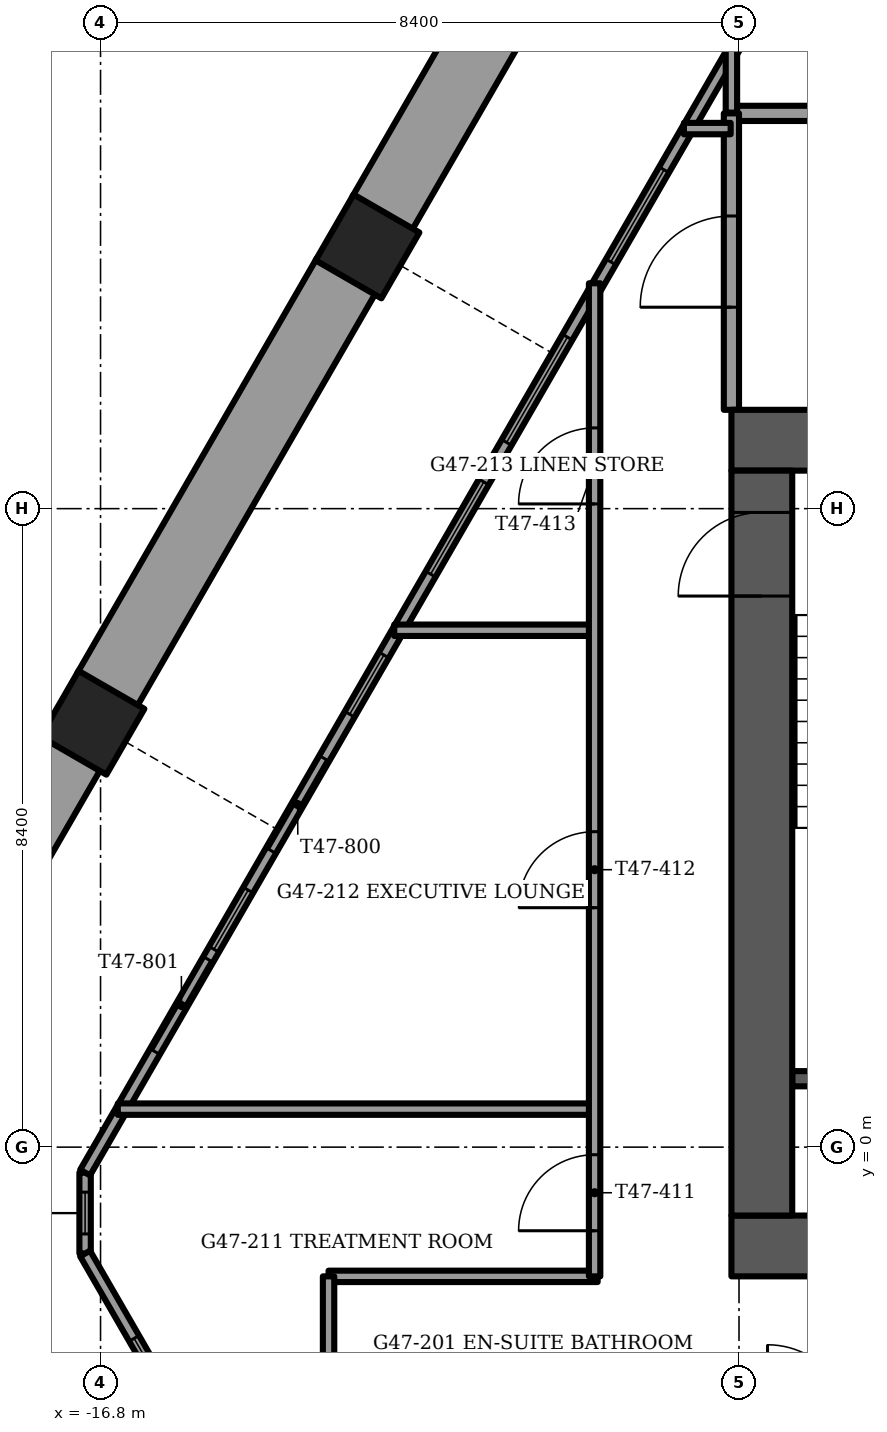
"""IFC4 building model, lengths in metres.
Left out: names, types, materials, properties, quantities, classifications, styles, units other than length and angle.
Written with IfcOpenShell. Run it as: python <this file> out.ifc"""

import sys

from ifc_helpers import new_model, si_unit, direction, frame, frame_2d, origin, origin_2d, place, context, subcontext, project, spatial, rectangle, extrude, element, fill, save


model = new_model("IFC4")
c1 = context("Model", 3, precision=1e-05, world=origin(), true_north=direction((0.0, 1.0)))
c2 = subcontext(c1, "Body", "Model", "MODEL_VIEW")
j1 = project(units=[si_unit("LENGTHUNIT", "METRE"), si_unit("PLANEANGLEUNIT", "RADIAN")], contexts=[c1])
p1 = place(None, origin())
s1 = spatial("IfcSite", under=j1, at=p1, CompositionType="ELEMENT")
p2 = place(p1, origin())
s2 = spatial("IfcBuilding", under=s1, at=p2, CompositionType="ELEMENT")
p3 = place(p2, frame((0.0, 0.0, 190.75)))
s3 = spatial("IfcBuildingStorey", under=s2, at=p3, CompositionType="ELEMENT", Elevation=190.75)
for number, where, z_axis, x_axis in (
    (1, (-13.288, 11.85, -1.2), (0.0, 0.0, 1.0), (0.5, 0.866, 0.0)),
    (2, (-16.906, 5.583, -1.2), (0.0, 0.0, 1.0), (0.5, 0.866, 0.0)),
):
    element("IfcColumn", number, at=place(p3, frame(where, z_axis=z_axis, x_axis=x_axis)), inside=s3, PredefinedType="COLUMN", context=c2, shape_type="SweptSolid", body=[
        extrude(rectangle(XDim=1.0, YDim=1.0, at=origin_2d()), origin(), (0.0, 0.0, 1.0), 3.75),
    ])
p4 = place(p3, frame((-8.5, -1.3, -0.3), z_axis=(0.0, 0.0, 1.0), x_axis=(1.0, 0.0, 0.0)))
e3 = element("IfcWall", 3, at=p4, inside=s3, PredefinedType="SHEAR", context=c2, shape_type="SweptSolid", body=[
    extrude(rectangle(XDim=17.0, YDim=0.8, at=frame_2d((8.5, 0.0))), origin(), (0.0, 0.0, 1.0), 3.75),
])
p5 = place(p4, frame((7.7, 0.0, 0.0)))
e4 = element("IfcOpeningElement", 4, at=p5, cuts=e3, PredefinedType="OPENING", context=c2, shape_type="SweptSolid", body=[
    extrude(rectangle(XDim=1.6, YDim=2.1, at=frame_2d((0.8, 1.05))), frame((0.0, 0.4, 0.0), z_axis=(0.0, -1.0, 0.0), x_axis=(1.0, 0.0, 0.0)), (0.0, 0.0, 1.0), 0.8),
])
p6 = place(p3, frame((-8.5, 9.3, -0.3), z_axis=(0.0, 0.0, 1.0), x_axis=(1.0, 0.0, 0.0)))
e5 = element("IfcWall", 5, at=p6, inside=s3, PredefinedType="SHEAR", context=c2, shape_type="SweptSolid", body=[
    extrude(rectangle(XDim=17.0, YDim=0.8, at=frame_2d((8.5, 0.0))), origin(), (0.0, 0.0, 1.0), 3.75),
])
p7 = place(p6, frame((7.7, 0.0, 0.0)))
e6 = element("IfcOpeningElement", 6, at=p7, cuts=e5, PredefinedType="OPENING", context=c2, shape_type="SweptSolid", body=[
    extrude(rectangle(XDim=1.6, YDim=2.1, at=frame_2d((0.8, 1.05))), frame((0.0, 0.4, 0.0), z_axis=(0.0, -1.0, 0.0), x_axis=(1.0, 0.0, 0.0)), (0.0, 0.0, 1.0), 0.8),
])
p8 = place(p6, frame((1.75, 0.0, 0.0)))
e7 = element("IfcOpeningElement", 7, at=p8, cuts=e5, PredefinedType="OPENING", context=c2, shape_type="SweptSolid", body=[
    extrude(rectangle(XDim=1.1, YDim=2.1, at=frame_2d((0.55, 1.05))), frame((0.0, 0.4, 0.0), z_axis=(0.0, -1.0, 0.0), x_axis=(1.0, 0.0, 0.0)), (0.0, 0.0, 1.0), 0.8),
])
p9 = place(p6, frame((14.15, 0.0, 0.0)))
e8 = element("IfcOpeningElement", 8, at=p9, cuts=e5, PredefinedType="OPENING", context=c2, shape_type="SweptSolid", body=[
    extrude(rectangle(XDim=1.1, YDim=2.1, at=frame_2d((0.55, 1.05))), frame((0.0, 0.4, 0.0), z_axis=(0.0, -1.0, 0.0), x_axis=(1.0, 0.0, 0.0)), (0.0, 0.0, 1.0), 0.8),
])
p10 = place(p3, frame((-8.1, -0.9, -0.3), z_axis=(0.0, 0.0, 1.0), x_axis=(0.0, 1.0, 0.0)))
e9 = element("IfcWall", 9, at=p10, inside=s3, PredefinedType="SHEAR", context=c2, shape_type="SweptSolid", body=[
    extrude(rectangle(XDim=9.8, YDim=0.8, at=frame_2d((4.9, 0.0))), origin(), (0.0, 0.0, 1.0), 3.75),
])
p11 = place(p10, frame((8.15, 0.0, 0.0)))
e10 = element("IfcOpeningElement", 10, at=p11, cuts=e9, PredefinedType="OPENING", context=c2, shape_type="SweptSolid", body=[
    extrude(rectangle(XDim=1.1, YDim=2.1, at=frame_2d((0.55, 1.05))), frame((0.0, 0.4, 0.0), z_axis=(0.0, -1.0, 0.0), x_axis=(1.0, 0.0, 0.0)), (0.0, 0.0, 1.0), 0.8),
])
p12 = place(p3, frame((-9.864, 17.88, 0.0), z_axis=(0.0, 0.0, 1.0), x_axis=(-0.500005767435, -0.866022073929, 0.0)))
e11 = element("IfcWall", 11, at=p12, inside=s3, PredefinedType="PARAPET", context=c2, shape_type="SweptSolid", body=[
    extrude(rectangle(XDim=6.465, YDim=0.9, at=frame_2d((3.232, 0.0))), origin(), (0.0, 0.0, 1.0), 1.1),
])
p13 = place(p3, frame((-13.566, 11.468, 0.0), z_axis=(0.0, 0.0, 1.0), x_axis=(-0.500013351051, -0.866017695414, 0.0)))
e12 = element("IfcWall", 12, at=p13, inside=s3, PredefinedType="PARAPET", context=c2, shape_type="SweptSolid", body=[
    extrude(rectangle(XDim=6.296, YDim=0.9, at=frame_2d((3.148, 0.0))), origin(), (0.0, 0.0, 1.0), 1.1),
])
p14 = place(p3, frame((-17.185, 5.201, 0.0), z_axis=(0.0, 0.0, 1.0), x_axis=(-0.499977443261, -0.866038426532, 0.0)))
e13 = element("IfcWall", 13, at=p14, inside=s3, PredefinedType="PARAPET", context=c2, shape_type="SweptSolid", body=[
    extrude(rectangle(XDim=6.465, YDim=0.9, at=frame_2d((3.232, 0.0))), origin(), (0.0, 0.0, 1.0), 1.1),
])
p15 = place(p3, frame((-6.826, 17.292, 0.0), z_axis=(0.0, 0.0, 1.0), x_axis=(-0.50000659594, -0.866021595583, 0.0)))
e14 = element("IfcWall", 14, at=p15, inside=s3, PredefinedType="SOLIDWALL", context=c2, shape_type="SweptSolid", body=[
    extrude(rectangle(XDim=20.354, YDim=0.15, at=frame_2d((10.177, 0.0))), origin(), (0.0, 0.0, 1.0), 3.45),
])
p16 = place(p15, frame((5.12, 0.0, 0.15)))
e15 = element("IfcOpeningElement", 15, at=p16, cuts=e14, PredefinedType="OPENING", context=c2, shape_type="SweptSolid", body=[
    extrude(rectangle(XDim=1.4, YDim=2.85, at=frame_2d((0.7, 1.425))), frame((0.0, 0.075, 0.0), z_axis=(0.0, -1.0, 0.0), x_axis=(1.0, 0.0, 0.0)), (0.0, 0.0, 1.0), 0.15),
])
p17 = place(p15, frame((7.663, 0.0, 0.15)))
e16 = element("IfcOpeningElement", 16, at=p17, cuts=e14, PredefinedType="OPENING", context=c2, shape_type="SweptSolid", body=[
    extrude(rectangle(XDim=1.6, YDim=2.85, at=frame_2d((0.8, 1.425))), frame((0.0, 0.075, 0.0), z_axis=(0.0, -1.0, 0.0), x_axis=(1.0, 0.0, 0.0)), (0.0, 0.0, 1.0), 0.15),
])
p18 = place(p15, frame((9.863, 0.0, 0.15)))
e17 = element("IfcOpeningElement", 17, at=p18, cuts=e14, PredefinedType="OPENING", context=c2, shape_type="SweptSolid", body=[
    extrude(rectangle(XDim=1.4, YDim=2.85, at=frame_2d((0.7, 1.425))), frame((0.0, 0.075, 0.0), z_axis=(0.0, -1.0, 0.0), x_axis=(1.0, 0.0, 0.0)), (0.0, 0.0, 1.0), 0.15),
])
p19 = place(p15, frame((12.492, 0.0, 0.15)))
e18 = element("IfcOpeningElement", 18, at=p19, cuts=e14, PredefinedType="OPENING", context=c2, shape_type="SweptSolid", body=[
    extrude(rectangle(XDim=0.9, YDim=2.85, at=frame_2d((0.45, 1.425))), frame((0.0, 0.075, 0.0), z_axis=(0.0, -1.0, 0.0), x_axis=(1.0, 0.0, 0.0)), (0.0, 0.0, 1.0), 0.15),
])
p20 = place(p15, frame((14.063, 0.0, 0.0)))
e19 = element("IfcOpeningElement", 19, at=p20, cuts=e14, PredefinedType="OPENING", context=c2, shape_type="SweptSolid", body=[
    extrude(rectangle(XDim=1.4, YDim=2.4, at=frame_2d((0.7, 1.2))), frame((0.0, 0.075, 0.0), z_axis=(0.0, -1.0, 0.0), x_axis=(1.0, 0.0, 0.0)), (0.0, 0.0, 1.0), 0.15),
])
p21 = place(p15, frame((16.063, 0.0, 0.15)))
e20 = element("IfcOpeningElement", 20, at=p21, cuts=e14, PredefinedType="OPENING", context=c2, shape_type="SweptSolid", body=[
    extrude(rectangle(XDim=0.9, YDim=2.85, at=frame_2d((0.45, 1.425))), frame((0.0, 0.075, 0.0), z_axis=(0.0, -1.0, 0.0), x_axis=(1.0, 0.0, 0.0)), (0.0, 0.0, 1.0), 0.15),
])
p22 = place(p15, frame((17.116, 0.0, 0.0)))
e21 = element("IfcOpeningElement", 21, at=p22, cuts=e14, PredefinedType="OPENING", context=c2, shape_type="SweptSolid", body=[
    extrude(rectangle(XDim=1.4, YDim=2.4, at=frame_2d((0.7, 1.2))), frame((0.0, 0.075, 0.0), z_axis=(0.0, -1.0, 0.0), x_axis=(1.0, 0.0, 0.0)), (0.0, 0.0, 1.0), 0.15),
])
p23 = place(p15, frame((0.735, 0.0, 0.15)))
e22 = element("IfcOpeningElement", 22, at=p23, cuts=e14, PredefinedType="OPENING", context=c2, shape_type="SweptSolid", body=[
    extrude(rectangle(XDim=1.6, YDim=2.73, at=frame_2d((0.8, 1.365))), frame((0.0, 0.075, 0.0), z_axis=(0.0, -1.0, 0.0), x_axis=(1.0, 0.0, 0.0)), (0.0, 0.0, 1.0), 0.15),
])
p24 = place(p3, frame((-17.003, -1.4, 0.0), z_axis=(0.0, 0.0, 1.0), x_axis=(0.500006098247, -0.866021882931, 0.0)))
e23 = element("IfcWall", 23, at=p24, inside=s3, PredefinedType="SOLIDWALL", context=c2, shape_type="SweptSolid", body=[
    extrude(rectangle(XDim=14.578, YDim=0.15, at=frame_2d((7.289, 0.0))), origin(), (0.0, 0.0, 1.0), 3.45),
])
p25 = place(p24, frame((1.289, 0.0, 0.15)))
e24 = element("IfcOpeningElement", 24, at=p25, cuts=e23, PredefinedType="OPENING", context=c2, shape_type="SweptSolid", body=[
    extrude(rectangle(XDim=0.9, YDim=2.85, at=frame_2d((0.45, 1.425))), frame((0.0, 0.075, 0.0), z_axis=(0.0, -1.0, 0.0), x_axis=(1.0, 0.0, 0.0)), (0.0, 0.0, 1.0), 0.15),
])
p26 = place(p24, frame((3.489, 0.0, 0.15)))
e25 = element("IfcOpeningElement", 25, at=p26, cuts=e23, PredefinedType="OPENING", context=c2, shape_type="SweptSolid", body=[
    extrude(rectangle(XDim=1.4, YDim=2.85, at=frame_2d((0.7, 1.425))), frame((0.0, 0.075, 0.0), z_axis=(0.0, -1.0, 0.0), x_axis=(1.0, 0.0, 0.0)), (0.0, 0.0, 1.0), 0.15),
])
p27 = place(p24, frame((5.982, 0.0, 0.15)))
e26 = element("IfcOpeningElement", 26, at=p27, cuts=e23, PredefinedType="OPENING", context=c2, shape_type="SweptSolid", body=[
    extrude(rectangle(XDim=1.6, YDim=2.85, at=frame_2d((0.8, 1.425))), frame((0.0, 0.075, 0.0), z_axis=(0.0, -1.0, 0.0), x_axis=(1.0, 0.0, 0.0)), (0.0, 0.0, 1.0), 0.15),
])
p28 = place(p24, frame((7.689, 0.0, 0.0)))
e27 = element("IfcOpeningElement", 27, at=p28, cuts=e23, PredefinedType="OPENING", context=c2, shape_type="SweptSolid", body=[
    extrude(rectangle(XDim=1.4, YDim=2.4, at=frame_2d((0.7, 1.2))), frame((0.0, 0.075, 0.0), z_axis=(0.0, -1.0, 0.0), x_axis=(1.0, 0.0, 0.0)), (0.0, 0.0, 1.0), 0.15),
])
p29 = place(p24, frame((9.689, 0.0, 0.15)))
e28 = element("IfcOpeningElement", 28, at=p29, cuts=e23, PredefinedType="OPENING", context=c2, shape_type="SweptSolid", body=[
    extrude(rectangle(XDim=0.9, YDim=2.85, at=frame_2d((0.45, 1.425))), frame((0.0, 0.075, 0.0), z_axis=(0.0, -1.0, 0.0), x_axis=(1.0, 0.0, 0.0)), (0.0, 0.0, 1.0), 0.15),
])
p30 = place(p3, frame((-17.003, -0.335, 0.0), z_axis=(0.0, 0.0, 1.0), x_axis=(0.0, -1.0, 0.0)))
e29 = element("IfcWall", 29, at=p30, inside=s3, PredefinedType="SOLIDWALL", context=c2, shape_type="SweptSolid", body=[
    extrude(rectangle(XDim=1.065, YDim=0.15, at=frame_2d((0.533, 0.0))), origin(), (0.0, 0.0, 1.0), 3.45),
])
p31 = place(p30, frame((0.258, 0.0, 0.15)))
e30 = element("IfcOpeningElement", 30, at=p31, cuts=e29, PredefinedType="OPENING", context=c2, shape_type="SweptSolid", body=[
    extrude(rectangle(XDim=0.55, YDim=2.85, at=frame_2d((0.275, 1.425))), frame((0.0, 0.075, 0.0), z_axis=(0.0, -1.0, 0.0), x_axis=(1.0, 0.0, 0.0)), (0.0, 0.0, 1.0), 0.15),
])
p32 = place(p3, frame((-7.7, 0.9, -0.3), z_axis=(0.0, 0.0, 1.0), x_axis=(1.0, 0.0, 0.0)))
e31 = element("IfcWall", 31, at=p32, inside=s3, PredefinedType="SOLIDWALL", context=c2, shape_type="SweptSolid", body=[
    extrude(rectangle(XDim=3.25, YDim=0.2, at=frame_2d((1.625, 0.0))), origin(), (0.0, 0.0, 1.0), 3.75),
])
p33 = place(p3, frame((-8.5, 13.6, 0.0), z_axis=(0.0, 0.0, 1.0), x_axis=(1.0, 0.0, 0.0)))
e32 = element("IfcWall", 32, at=p33, inside=s3, PredefinedType="PARTITIONING", context=c2, shape_type="SweptSolid", body=[
    extrude(rectangle(XDim=17.0, YDim=0.2, at=frame_2d((8.5, 0.0))), origin(), (0.0, 0.0, 1.0), 3.45),
])
p34 = place(p33, frame((8.0, 0.0, 0.0)))
e33 = element("IfcOpeningElement", 33, at=p34, cuts=e32, PredefinedType="OPENING", context=c2, shape_type="SweptSolid", body=[
    extrude(rectangle(XDim=1.0, YDim=2.1, at=frame_2d((0.5, 1.05))), frame((0.0, 0.1, 0.0), z_axis=(0.0, -1.0, 0.0), x_axis=(1.0, 0.0, 0.0)), (0.0, 0.0, 1.0), 0.2),
])
p35 = place(p3, frame((-8.5, 9.7, 0.0), z_axis=(0.0, 0.0, 1.0), x_axis=(0.0, 1.0, 0.0)))
e34 = element("IfcWall", 34, at=p35, inside=s3, PredefinedType="PARTITIONING", context=c2, shape_type="SweptSolid", body=[
    extrude(rectangle(XDim=3.9, YDim=0.2, at=frame_2d((1.95, 0.0))), origin(), (0.0, 0.0, 1.0), 3.45),
])
p36 = place(p35, frame((1.35, 0.0, 0.0)))
e35 = element("IfcOpeningElement", 35, at=p36, cuts=e34, PredefinedType="OPENING", context=c2, shape_type="SweptSolid", body=[
    extrude(rectangle(XDim=1.2, YDim=2.1, at=frame_2d((0.6, 1.05))), frame((0.0, 0.1, 0.0), z_axis=(0.0, -1.0, 0.0), x_axis=(1.0, 0.0, 0.0)), (0.0, 0.0, 1.0), 0.2),
])
p37 = place(p3, frame((-13.8, -1.7, 0.0), z_axis=(0.0, 0.0, 1.0), x_axis=(1.0, 0.0, 0.0)))
e36 = element("IfcWall", 36, at=p37, inside=s3, PredefinedType="PARTITIONING", context=c2, shape_type="SweptSolid", body=[
    extrude(rectangle(XDim=3.54, YDim=0.15, at=frame_2d((1.77, 0.0))), origin(), (0.0, 0.0, 1.0), 3.45),
])
p38 = place(p3, frame((-16.573, 0.5, 0.0), z_axis=(0.0, 0.0, 1.0), x_axis=(1.0, 0.0, 0.0)))
e37 = element("IfcWall", 37, at=p38, inside=s3, PredefinedType="PARTITIONING", context=c2, shape_type="SweptSolid", body=[
    extrude(rectangle(XDim=6.273, YDim=0.15, at=frame_2d((3.136, 0.0))), origin(), (0.0, 0.0, 1.0), 3.45),
])
p39 = place(p3, frame((-12.936, 6.8, 0.0), z_axis=(0.0, 0.0, 1.0), x_axis=(1.0, 0.0, 0.0)))
e38 = element("IfcWall", 38, at=p39, inside=s3, PredefinedType="PARTITIONING", context=c2, shape_type="SweptSolid", body=[
    extrude(rectangle(XDim=2.636, YDim=0.15, at=frame_2d((1.318, 0.0))), origin(), (0.0, 0.0, 1.0), 3.45),
])
p40 = place(p3, frame((-9.125, 13.4, 0.0), z_axis=(0.0, 0.0, 1.0), x_axis=(1.0, 0.0, 0.0)))
e39 = element("IfcWall", 39, at=p40, inside=s3, PredefinedType="PARTITIONING", context=c2, shape_type="SweptSolid", body=[
    extrude(rectangle(XDim=0.615, YDim=0.15, at=frame_2d((0.308, 0.0))), origin(), (0.0, 0.0, 1.0), 3.45),
])
p41 = place(p3, frame((-8.5, 13.61, 0.0), z_axis=(0.0, 0.0, 1.0), x_axis=(0.0, 1.0, 0.0)))
e40 = element("IfcWall", 40, at=p41, inside=s3, PredefinedType="PARTITIONING", context=c2, shape_type="SweptSolid", body=[
    extrude(rectangle(XDim=0.873, YDim=0.15, at=frame_2d((0.437, 0.0))), origin(), (0.0, 0.0, 1.0), 3.45),
])
p42 = place(p3, frame((-10.3, -1.7, 0.0), z_axis=(0.0, 0.0, 1.0), x_axis=(0.0, 1.0, 0.0)))
e41 = element("IfcWall", 41, at=p42, inside=s3, PredefinedType="PARTITIONING", context=c2, shape_type="SweptSolid", body=[
    extrude(rectangle(XDim=13.065, YDim=0.15, at=frame_2d((6.532, 0.0))), origin(), (0.0, 0.0, 1.0), 3.45),
])
p43 = place(p42, frame((0.6, 0.0, 0.0)))
e42 = element("IfcOpeningElement", 42, at=p43, cuts=e41, PredefinedType="OPENING", context=c2, shape_type="SweptSolid", body=[
    extrude(rectangle(XDim=1.0, YDim=2.1, at=frame_2d((0.5, 1.05))), frame((0.0, 0.075, 0.0), z_axis=(0.0, -1.0, 0.0), x_axis=(1.0, 0.0, 0.0)), (0.0, 0.0, 1.0), 0.15),
])
p44 = place(p42, frame((4.85, 0.0, 0.0)))
e43 = element("IfcOpeningElement", 43, at=p44, cuts=e41, PredefinedType="OPENING", context=c2, shape_type="SweptSolid", body=[
    extrude(rectangle(XDim=1.0, YDim=2.1, at=frame_2d((0.5, 1.05))), frame((0.0, 0.075, 0.0), z_axis=(0.0, -1.0, 0.0), x_axis=(1.0, 0.0, 0.0)), (0.0, 0.0, 1.0), 0.15),
])
p45 = place(p42, frame((10.162, 0.0, 0.0)))
e44 = element("IfcOpeningElement", 44, at=p45, cuts=e41, PredefinedType="OPENING", context=c2, shape_type="SweptSolid", body=[
    extrude(rectangle(XDim=1.0, YDim=2.1, at=frame_2d((0.5, 1.05))), frame((0.0, 0.075, 0.0), z_axis=(0.0, -1.0, 0.0), x_axis=(1.0, 0.0, 0.0)), (0.0, 0.0, 1.0), 0.15),
])
p46 = place(p3, frame((-13.8, -3.7, 0.0), z_axis=(0.0, 0.0, 1.0), x_axis=(0.0, 1.0, 0.0)))
e45 = element("IfcWall", 45, at=p46, inside=s3, PredefinedType="PARTITIONING", context=c2, shape_type="SweptSolid", body=[
    extrude(rectangle(XDim=2.0, YDim=0.15, at=frame_2d((1.0, 0.0))), origin(), (0.0, 0.0, 1.0), 3.45),
])
p47 = place(p16, origin())
e46 = element("IfcWindow", 46, at=p47, inside=s3, PartitioningType="SINGLE_PANEL", PredefinedType="WINDOW", context=c2, shape_type="SweptSolid", body=[
    extrude(rectangle(XDim=1.4, YDim=2.85, at=frame_2d((0.7, 1.425))), frame((0.0, 0.03, 0.0), z_axis=(0.0, -1.0, 0.0), x_axis=(1.0, 0.0, 0.0)), (0.0, 0.0, 1.0), 0.06),
])
fill(e15, e46)
p48 = place(p17, origin())
e47 = element("IfcWindow", 47, at=p48, inside=s3, PartitioningType="SINGLE_PANEL", PredefinedType="WINDOW", context=c2, shape_type="SweptSolid", body=[
    extrude(rectangle(XDim=1.6, YDim=2.85, at=frame_2d((0.8, 1.425))), frame((0.0, 0.03, 0.0), z_axis=(0.0, -1.0, 0.0), x_axis=(1.0, 0.0, 0.0)), (0.0, 0.0, 1.0), 0.06),
])
fill(e16, e47)
p49 = place(p18, origin())
e48 = element("IfcWindow", 48, at=p49, inside=s3, PartitioningType="SINGLE_PANEL", PredefinedType="WINDOW", context=c2, shape_type="SweptSolid", body=[
    extrude(rectangle(XDim=1.4, YDim=2.85, at=frame_2d((0.7, 1.425))), frame((0.0, 0.03, 0.0), z_axis=(0.0, -1.0, 0.0), x_axis=(1.0, 0.0, 0.0)), (0.0, 0.0, 1.0), 0.06),
])
fill(e17, e48)
p50 = place(p19, origin())
e49 = element("IfcWindow", 49, at=p50, inside=s3, PartitioningType="SINGLE_PANEL", PredefinedType="WINDOW", context=c2, shape_type="SweptSolid", body=[
    extrude(rectangle(XDim=0.9, YDim=2.85, at=frame_2d((0.45, 1.425))), frame((0.0, 0.03, 0.0), z_axis=(0.0, -1.0, 0.0), x_axis=(1.0, 0.0, 0.0)), (0.0, 0.0, 1.0), 0.06),
])
fill(e18, e49)
p51 = place(p20, origin())
e50 = element("IfcDoor", 50, at=p51, inside=s3, OperationType="SLIDING_TO_LEFT", PredefinedType="DOOR", context=c2, shape_type="SweptSolid", body=[
    extrude(rectangle(XDim=1.4, YDim=2.4, at=frame_2d((0.7, 1.2))), frame((0.0, 0.025, 0.0), z_axis=(0.0, -1.0, 0.0), x_axis=(1.0, 0.0, 0.0)), (0.0, 0.0, 1.0), 0.05),
])
fill(e19, e50)
p52 = place(p21, origin())
e51 = element("IfcWindow", 51, at=p52, inside=s3, PartitioningType="SINGLE_PANEL", PredefinedType="WINDOW", context=c2, shape_type="SweptSolid", body=[
    extrude(rectangle(XDim=0.9, YDim=2.85, at=frame_2d((0.45, 1.425))), frame((0.0, 0.03, 0.0), z_axis=(0.0, -1.0, 0.0), x_axis=(1.0, 0.0, 0.0)), (0.0, 0.0, 1.0), 0.06),
])
fill(e20, e51)
p53 = place(p22, origin())
e52 = element("IfcDoor", 52, at=p53, inside=s3, OperationType="SLIDING_TO_RIGHT", PredefinedType="DOOR", context=c2, shape_type="SweptSolid", body=[
    extrude(rectangle(XDim=1.4, YDim=2.4, at=frame_2d((0.7, 1.2))), frame((0.0, 0.025, 0.0), z_axis=(0.0, -1.0, 0.0), x_axis=(1.0, 0.0, 0.0)), (0.0, 0.0, 1.0), 0.05),
])
fill(e21, e52)
p54 = place(p25, origin())
e53 = element("IfcWindow", 53, at=p54, inside=s3, PartitioningType="SINGLE_PANEL", PredefinedType="WINDOW", context=c2, shape_type="SweptSolid", body=[
    extrude(rectangle(XDim=0.9, YDim=2.85, at=frame_2d((0.45, 1.425))), frame((0.0, 0.03, 0.0), z_axis=(0.0, -1.0, 0.0), x_axis=(1.0, 0.0, 0.0)), (0.0, 0.0, 1.0), 0.06),
])
fill(e24, e53)
p55 = place(p31, origin())
e54 = element("IfcWindow", 54, at=p55, inside=s3, PartitioningType="SINGLE_PANEL", PredefinedType="WINDOW", context=c2, shape_type="SweptSolid", body=[
    extrude(rectangle(XDim=0.55, YDim=2.85, at=frame_2d((0.275, 1.425))), frame((0.0, 0.03, 0.0), z_axis=(0.0, -1.0, 0.0), x_axis=(1.0, 0.0, 0.0)), (0.0, 0.0, 1.0), 0.06),
])
fill(e30, e54)
p56 = place(p11, origin())
e55 = element("IfcDoor", 55, at=p56, inside=s3, OperationType="SINGLE_SWING_RIGHT", PredefinedType="DOOR", context=c2, shape_type="SweptSolid", body=[
    extrude(rectangle(XDim=1.1, YDim=2.1, at=frame_2d((0.55, 1.05))), frame((0.0, 0.025, 0.0), z_axis=(0.0, -1.0, 0.0), x_axis=(1.0, 0.0, 0.0)), (0.0, 0.0, 1.0), 0.05),
])
fill(e10, e55)
p57 = place(p36, origin())
e56 = element("IfcDoor", 56, at=p57, inside=s3, OperationType="SINGLE_SWING_LEFT", PredefinedType="DOOR", context=c2, shape_type="SweptSolid", body=[
    extrude(rectangle(XDim=1.2, YDim=2.1, at=frame_2d((0.6, 1.05))), frame((0.0, 0.025, 0.0), z_axis=(0.0, -1.0, 0.0), x_axis=(1.0, 0.0, 0.0)), (0.0, 0.0, 1.0), 0.05),
])
fill(e35, e56)
p58 = place(p43, origin())
e57 = element("IfcDoor", 57, at=p58, inside=s3, OperationType="SINGLE_SWING_RIGHT", PredefinedType="DOOR", context=c2, shape_type="SweptSolid", body=[
    extrude(rectangle(XDim=1.0, YDim=2.1, at=frame_2d((0.5, 1.05))), frame((0.0, 0.025, 0.0), z_axis=(0.0, -1.0, 0.0), x_axis=(1.0, 0.0, 0.0)), (0.0, 0.0, 1.0), 0.05),
])
fill(e42, e57)
p59 = place(p44, origin())
e58 = element("IfcDoor", 58, at=p59, inside=s3, OperationType="SINGLE_SWING_LEFT", PredefinedType="DOOR", context=c2, shape_type="SweptSolid", body=[
    extrude(rectangle(XDim=1.0, YDim=2.1, at=frame_2d((0.5, 1.05))), frame((0.0, 0.025, 0.0), z_axis=(0.0, -1.0, 0.0), x_axis=(1.0, 0.0, 0.0)), (0.0, 0.0, 1.0), 0.05),
])
fill(e43, e58)
p60 = place(p45, origin())
e59 = element("IfcDoor", 59, at=p60, inside=s3, OperationType="SINGLE_SWING_LEFT", PredefinedType="DOOR", context=c2, shape_type="SweptSolid", body=[
    extrude(rectangle(XDim=1.0, YDim=2.1, at=frame_2d((0.5, 1.05))), frame((0.0, 0.025, 0.0), z_axis=(0.0, -1.0, 0.0), x_axis=(1.0, 0.0, 0.0)), (0.0, 0.0, 1.0), 0.05),
])
fill(e44, e59)
save(model, sys.argv[1])
